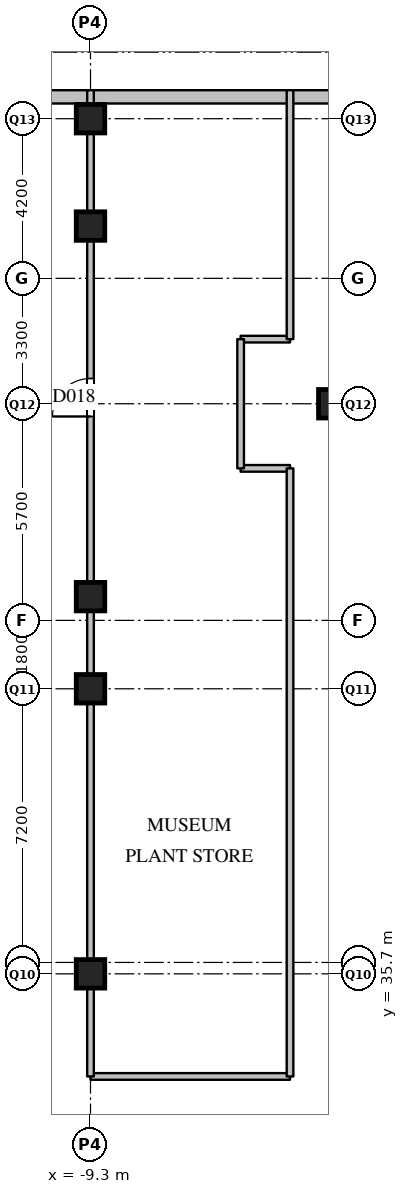
"""IFC4 building model, lengths in metres.
Left out: names, types, materials, properties, quantities, classifications, styles, units other than length and angle.
Written with IfcOpenShell. Run it as: python <this file> out.ifc"""

import sys

from ifc_helpers import new_model, si_unit, direction, frame, frame_2d, origin, origin_2d, place, context, subcontext, project, spatial, rectangle, extrude, element, fill, save


model = new_model("IFC4")
c1 = context("Model", 3, precision=1e-05, world=origin(), true_north=direction((0.0, 1.0)))
c2 = subcontext(c1, "Body", "Model", "MODEL_VIEW")
j1 = project(units=[si_unit("LENGTHUNIT", "METRE"), si_unit("PLANEANGLEUNIT", "RADIAN")], contexts=[c1])
p1 = place(None, origin())
s1 = spatial("IfcSite", under=j1, at=p1, CompositionType="ELEMENT")
p2 = place(p1, origin())
s2 = spatial("IfcBuilding", under=s1, at=p2, CompositionType="ELEMENT")
p3 = place(p2, frame((0.0, 0.0, -6.0)))
s3 = spatial("IfcBuildingStorey", under=s2, at=p3, CompositionType="ELEMENT", Elevation=-6.0)
p4 = place(p3, frame((-20.35, 58.775, 0.0), z_axis=(0.0, 0.0, 1.0), x_axis=(1.0, 0.0, 0.0)))
e1 = element("IfcWall", 1, at=p4, inside=s3, PredefinedType="SOLIDWALL", context=c2, shape_type="SweptSolid", body=[
    extrude(rectangle(XDim=19.3, YDim=0.35, at=frame_2d((9.65, 0.0))), origin(), (0.0, 0.0, 1.0), 5.59),
])
for number, where, z_axis, x_axis in (
    (2, (-9.3, 35.7, 0.0), (0.0, 0.0, 1.0), (1.0, 0.0, 0.0)),
    (3, (-9.3, 43.2, 0.0), (0.0, 0.0, 1.0), (1.0, 0.0, 0.0)),
    (4, (-9.3, 58.2, 0.0), (0.0, 0.0, 1.0), (1.0, 0.0, 0.0)),
    (5, (-9.3, 45.625, 0.0), (0.0, 0.0, 1.0), (1.0, 0.0, 0.0)),
    (6, (-9.3, 55.375, 0.0), (0.0, 0.0, 1.0), (1.0, 0.0, 0.0)),
    (7, (-2.925, 50.7, 0.0), (0.0, 0.0, 1.0), (1.0, 0.0, 0.0)),
):
    element("IfcColumn", number, at=place(p3, frame(where, z_axis=z_axis, x_axis=x_axis)), inside=s3, PredefinedType="COLUMN", context=c2, shape_type="SweptSolid", body=[
        extrude(rectangle(XDim=0.75, YDim=0.75, at=origin_2d()), origin(), (0.0, 0.0, 1.0), 6.0),
    ])
p5 = place(p3, frame((-9.3, 33.0, 0.0), z_axis=(0.0, 0.0, 1.0), x_axis=(1.0, 0.0, 0.0)))
e8 = element("IfcWall", 8, at=p5, inside=s3, PredefinedType="PARTITIONING", context=c2, shape_type="SweptSolid", body=[
    extrude(rectangle(XDim=5.25, YDim=0.175, at=frame_2d((2.625, 0.0))), origin(), (0.0, 0.0, 1.0), 4.79),
])
for number, where, z_axis, x_axis in (
    (9, (-5.35, 49.0, 0.0), (0.0, 0.0, 1.0), (1.0, 0.0, 0.0)),
    (10, (-5.35, 52.4, 0.0), (0.0, 0.0, 1.0), (1.0, 0.0, 0.0)),
):
    element("IfcWall", number, at=place(p3, frame(where, z_axis=z_axis, x_axis=x_axis)), inside=s3, PredefinedType="PARTITIONING", context=c2, shape_type="SweptSolid", body=[
        extrude(rectangle(XDim=1.3, YDim=0.175, at=frame_2d((0.65, 0.0))), origin(), (0.0, 0.0, 1.0), 5.59),
    ])
p6 = place(p3, frame((-9.3, 33.0, 0.0), z_axis=(0.0, 0.0, 1.0), x_axis=(0.0, 1.0, 0.0)))
e11 = element("IfcWall", 11, at=p6, inside=s3, PredefinedType="PARTITIONING", context=c2, shape_type="SweptSolid", body=[
    extrude(rectangle(XDim=25.95, YDim=0.175, at=frame_2d((12.975, 0.0))), origin(), (0.0, 0.0, 1.0), 4.79),
])
p7 = place(p6, frame((17.365, 0.0, 0.0)))
e12 = element("IfcOpeningElement", 12, at=p7, cuts=e11, PredefinedType="OPENING", context=c2, shape_type="SweptSolid", body=[
    extrude(rectangle(XDim=1.0, YDim=2.1, at=frame_2d((0.5, 1.05))), frame((0.0, 0.097, 0.0), z_axis=(0.0, -1.0, 0.0), x_axis=(1.0, 0.0, 0.0)), (0.0, 0.0, 1.0), 0.195),
])
p8 = place(p3, frame((-5.35, 49.0, 0.0), z_axis=(0.0, 0.0, 1.0), x_axis=(0.0, 1.0, 0.0)))
e13 = element("IfcWall", 13, at=p8, inside=s3, PredefinedType="PARTITIONING", context=c2, shape_type="SweptSolid", body=[
    extrude(rectangle(XDim=3.4, YDim=0.175, at=frame_2d((1.7, 0.0))), origin(), (0.0, 0.0, 1.0), 5.59),
])
p9 = place(p3, frame((-4.05, 33.0, 0.0), z_axis=(0.0, 0.0, 1.0), x_axis=(0.0, 1.0, 0.0)))
e14 = element("IfcWall", 14, at=p9, inside=s3, PredefinedType="PARTITIONING", context=c2, shape_type="SweptSolid", body=[
    extrude(rectangle(XDim=16.0, YDim=0.175, at=frame_2d((8.0, 0.0))), origin(), (0.0, 0.0, 1.0), 4.79),
])
p10 = place(p3, frame((-4.05, 52.4, 0.0), z_axis=(0.0, 0.0, 1.0), x_axis=(0.0, 1.0, 0.0)))
e15 = element("IfcWall", 15, at=p10, inside=s3, PredefinedType="PARTITIONING", context=c2, shape_type="SweptSolid", body=[
    extrude(rectangle(XDim=6.55, YDim=0.175, at=frame_2d((3.275, 0.0))), origin(), (0.0, 0.0, 1.0), 4.79),
])
p11 = place(p7, origin())
e16 = element("IfcDoor", 16, at=p11, inside=s3, OperationType="SINGLE_SWING_LEFT", PredefinedType="DOOR", context=c2, shape_type="SweptSolid", body=[
    extrude(rectangle(XDim=1.0, YDim=2.1, at=frame_2d((0.5, 1.05))), frame((0.0, 0.025, 0.0), z_axis=(0.0, -1.0, 0.0), x_axis=(1.0, 0.0, 0.0)), (0.0, 0.0, 1.0), 0.05),
])
fill(e12, e16)
save(model, sys.argv[1])
